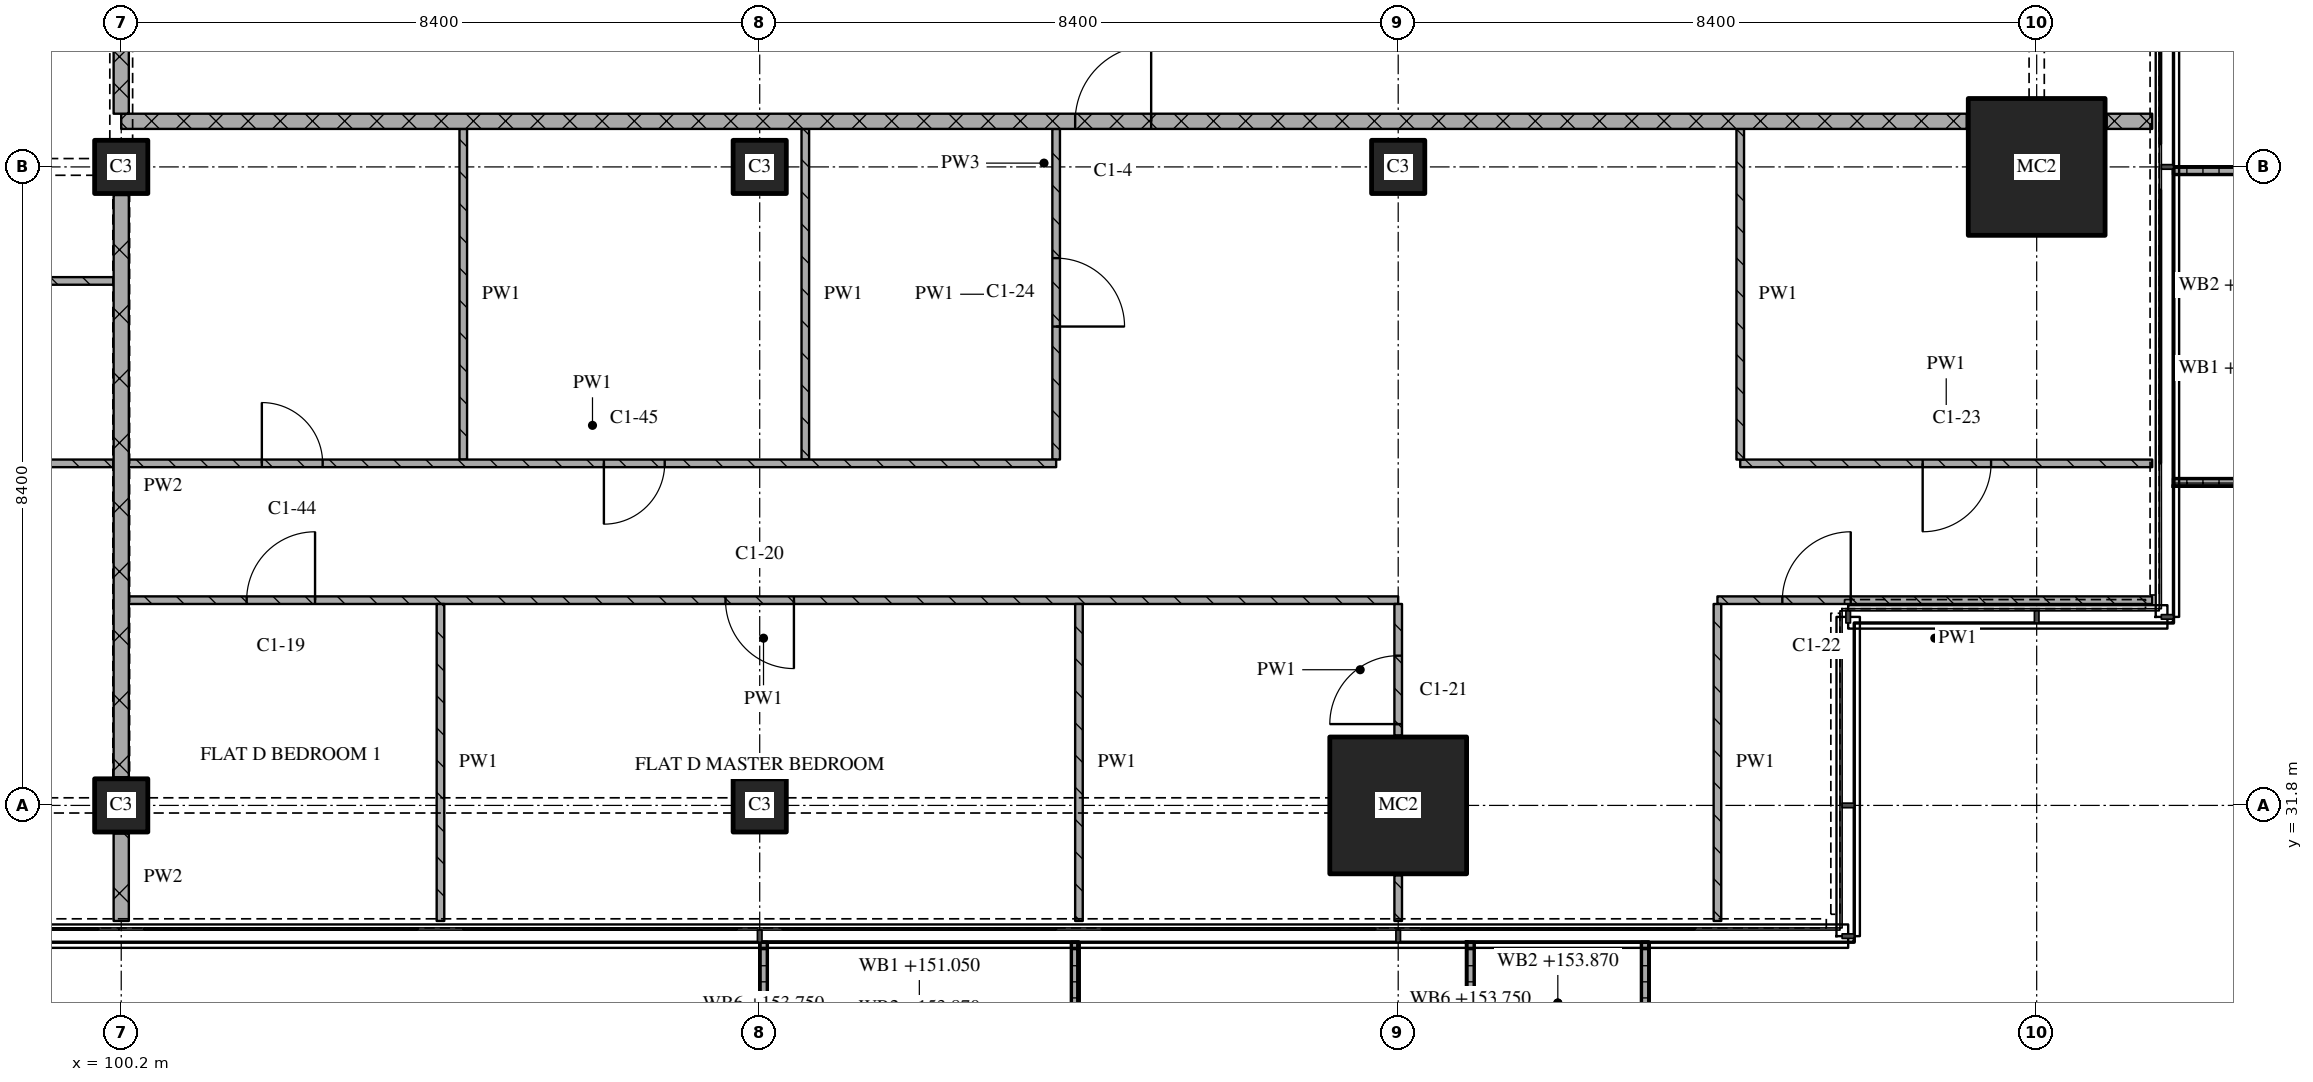
"""IFC4 building model, lengths in metres.
Left out: names, types, materials, properties, quantities, classifications, styles, units other than length and angle.
Written with IfcOpenShell. Run it as: python <this file> out.ifc"""

import sys

from ifc_helpers import new_model, si_unit, direction, frame, frame_2d, origin, origin_2d, place, context, subcontext, project, spatial, polyline, rectangle, outline, extrude, element, fill, save


model = new_model("IFC4")
c1 = context("Model", 3, precision=1e-05, world=origin(), true_north=direction((0.0, 1.0)))
c2 = subcontext(c1, "Body", "Model", "MODEL_VIEW")
j1 = project(units=[si_unit("LENGTHUNIT", "METRE"), si_unit("PLANEANGLEUNIT", "RADIAN")], contexts=[c1])
p1 = place(None, origin())
s1 = spatial("IfcSite", under=j1, at=p1, CompositionType="ELEMENT")
p2 = place(p1, origin())
s2 = spatial("IfcBuilding", under=s1, at=p2, CompositionType="ELEMENT")
p3 = place(p2, frame((0.0, 0.0, 151.05)))
s3 = spatial("IfcBuildingStorey", under=s2, at=p3, CompositionType="ELEMENT", Elevation=151.05)
for number, where, z_axis, x_axis in (
    (1, (100.2, 31.8, 0.0), (0.0, 0.0, 1.0), (1.0, 0.0, 0.0)),
    (2, (100.2, 40.2, 0.0), (0.0, 0.0, 1.0), (1.0, 0.0, 0.0)),
    (3, (108.6, 31.8, 0.0), (0.0, 0.0, 1.0), (1.0, 0.0, 0.0)),
    (4, (108.6, 40.2, 0.0), (0.0, 0.0, 1.0), (1.0, 0.0, 0.0)),
):
    element("IfcColumn", number, at=place(p3, frame(where, z_axis=z_axis, x_axis=x_axis)), inside=s3, PredefinedType="COLUMN", context=c2, shape_type="SweptSolid", body=[
        extrude(rectangle(XDim=0.7, YDim=0.7, at=origin_2d()), origin(), (0.0, 0.0, 1.0), 3.6),
    ])
p4 = place(p3, frame((117.0, 31.8, 0.0), z_axis=(0.0, 0.0, 1.0), x_axis=(1.0, 0.0, 0.0)))
e5 = element("IfcColumn", 5, at=p4, inside=s3, PredefinedType="COLUMN", context=c2, shape_type="SweptSolid", body=[
    extrude(rectangle(XDim=1.8, YDim=1.8, at=origin_2d()), origin(), (0.0, 0.0, 1.0), 3.6),
])
p5 = place(p3, frame((117.0, 40.2, 0.0), z_axis=(0.0, 0.0, 1.0), x_axis=(1.0, 0.0, 0.0)))
e6 = element("IfcColumn", 6, at=p5, inside=s3, PredefinedType="COLUMN", context=c2, shape_type="SweptSolid", body=[
    extrude(rectangle(XDim=0.7, YDim=0.7, at=origin_2d()), origin(), (0.0, 0.0, 1.0), 3.6),
])
p6 = place(p3, frame((125.4, 40.2, 0.0), z_axis=(0.0, 0.0, 1.0), x_axis=(1.0, 0.0, 0.0)))
e7 = element("IfcColumn", 7, at=p6, inside=s3, PredefinedType="COLUMN", context=c2, shape_type="SweptSolid", body=[
    extrude(rectangle(XDim=1.8, YDim=1.8, at=origin_2d()), origin(), (0.0, 0.0, 1.0), 3.6),
])
p7 = place(p3, origin())
e8 = element("IfcWall", 8, at=p7, inside=s3, PredefinedType="SOLIDWALL", context=c2, shape_type="SweptSolid", body=[
    extrude(outline(polyline([(108.6, 30.0), (108.7, 30.0), (108.7, 28.367), (112.7, 28.367), (112.7, 30.0), (112.8, 30.0), (112.8, 28.267), (108.6, 28.267), (108.6, 30.0)])), origin(), (0.0, 0.0, 1.0), 1.0),
])
p8 = place(p3, origin())
e9 = element("IfcWall", 9, at=p8, inside=s3, PredefinedType="SOLIDWALL", context=c2, shape_type="SweptSolid", body=[
    extrude(outline(polyline([(117.9, 30.0), (118.0, 30.0), (118.0, 28.5), (120.2, 28.5), (120.2, 30.0), (120.3, 30.0), (120.3, 28.4), (117.9, 28.4), (117.9, 30.0)])), origin(), (0.0, 0.0, 1.0), 1.0),
])
p9 = place(p3, origin())
e10 = element("IfcWall", 10, at=p9, inside=s3, PredefinedType="SOLIDWALL", context=c2, shape_type="SweptSolid", body=[
    extrude(outline(polyline([(127.2, 36.0), (127.2, 36.1), (128.833, 36.1), (128.833, 40.1), (127.2, 40.1), (127.2, 40.2), (128.933, 40.2), (128.933, 36.0), (127.2, 36.0)])), origin(), (0.0, 0.0, 1.0), 1.0),
])
p10 = place(p3, frame((117.0, 34.5, 0.0), z_axis=(0.0, 0.0, 1.0), x_axis=(-1.0, 0.0, 0.0)))
e11 = element("IfcWall", 11, at=p10, inside=s3, PredefinedType="PARTITIONING", context=c2, shape_type="SweptSolid", body=[
    extrude(rectangle(XDim=16.7, YDim=0.1, at=frame_2d((8.35, 0.0))), origin(), (0.0, 0.0, 1.0), 3.32),
])
p11 = place(p10, frame((7.95, 0.0, 0.0)))
e12 = element("IfcOpeningElement", 12, at=p11, cuts=e11, PredefinedType="OPENING", context=c2, shape_type="SweptSolid", body=[
    extrude(rectangle(XDim=0.9, YDim=2.1, at=frame_2d((0.45, 1.05))), frame((0.0, 0.06, 0.0), z_axis=(0.0, -1.0, 0.0), x_axis=(1.0, 0.0, 0.0)), (0.0, 0.0, 1.0), 0.12),
])
p12 = place(p10, frame((14.25, 0.0, 0.0)))
e13 = element("IfcOpeningElement", 13, at=p12, cuts=e11, PredefinedType="OPENING", context=c2, shape_type="SweptSolid", body=[
    extrude(rectangle(XDim=0.9, YDim=2.1, at=frame_2d((0.45, 1.05))), frame((0.0, 0.06, 0.0), z_axis=(0.0, -1.0, 0.0), x_axis=(1.0, 0.0, 0.0)), (0.0, 0.0, 1.0), 0.12),
])
p13 = place(p3, frame((126.92, 34.5, 0.0), z_axis=(0.0, 0.0, 1.0), x_axis=(-1.0, 0.0, 0.0)))
e14 = element("IfcWall", 14, at=p13, inside=s3, PredefinedType="PARTITIONING", context=c2, shape_type="SweptSolid", body=[
    extrude(rectangle(XDim=5.72, YDim=0.1, at=frame_2d((2.86, 0.0))), origin(), (0.0, 0.0, 1.0), 3.32),
])
p14 = place(p13, frame((3.966, 0.0, 0.0)))
e15 = element("IfcOpeningElement", 15, at=p14, cuts=e14, PredefinedType="OPENING", context=c2, shape_type="SweptSolid", body=[
    extrude(rectangle(XDim=0.9, YDim=2.1, at=frame_2d((0.45, 1.05))), frame((0.0, 0.06, 0.0), z_axis=(0.0, -1.0, 0.0), x_axis=(1.0, 0.0, 0.0)), (0.0, 0.0, 1.0), 0.12),
])
p15 = place(p3, frame((121.5, 36.3, 0.0), z_axis=(0.0, 0.0, 1.0), x_axis=(1.0, 0.0, 0.0)))
e16 = element("IfcWall", 16, at=p15, inside=s3, PredefinedType="PARTITIONING", context=c2, shape_type="SweptSolid", body=[
    extrude(rectangle(XDim=5.42, YDim=0.1, at=frame_2d((2.71, 0.0))), origin(), (0.0, 0.0, 1.0), 3.32),
])
p16 = place(p15, frame((2.4, 0.0, 0.0)))
e17 = element("IfcOpeningElement", 17, at=p16, cuts=e16, PredefinedType="OPENING", context=c2, shape_type="SweptSolid", body=[
    extrude(rectangle(XDim=0.9, YDim=2.1, at=frame_2d((0.45, 1.05))), frame((0.0, 0.06, 0.0), z_axis=(0.0, -1.0, 0.0), x_axis=(1.0, 0.0, 0.0)), (0.0, 0.0, 1.0), 0.12),
])
p17 = place(p3, frame((93.0, 38.7, 0.0), z_axis=(0.0, 0.0, 1.0), x_axis=(1.0, 0.0, 0.0)))
e18 = element("IfcWall", 18, at=p17, inside=s3, PredefinedType="PARTITIONING", context=c2, shape_type="SweptSolid", body=[
    extrude(rectangle(XDim=7.1, YDim=0.1, at=frame_2d((3.55, 0.0))), origin(), (0.0, 0.0, 1.0), 3.32),
])
p18 = place(p17, frame((5.45, 0.0, 0.0)))
e19 = element("IfcOpeningElement", 19, at=p18, cuts=e18, PredefinedType="OPENING", context=c2, shape_type="SweptSolid", body=[
    extrude(rectangle(XDim=0.8, YDim=2.1, at=frame_2d((0.4, 1.05))), frame((0.0, 0.06, 0.0), z_axis=(0.0, -1.0, 0.0), x_axis=(1.0, 0.0, 0.0)), (0.0, 0.0, 1.0), 0.12),
])
p19 = place(p3, frame((124.48, 40.8, 0.0), z_axis=(0.0, 0.0, 1.0), x_axis=(-1.0, 0.0, 0.0)))
e20 = element("IfcWall", 20, at=p19, inside=s3, PredefinedType="PARTITIONING", context=c2, shape_type="SweptSolid", body=[
    extrude(rectangle(XDim=24.28, YDim=0.2, at=frame_2d((12.14, 0.0))), origin(), (0.0, 0.0, 1.0), 3.32),
])
p20 = place(p19, frame((10.73, 0.0, 0.0)))
e21 = element("IfcOpeningElement", 21, at=p20, cuts=e20, PredefinedType="OPENING", context=c2, shape_type="SweptSolid", body=[
    extrude(rectangle(XDim=1.0, YDim=2.1, at=frame_2d((0.5, 1.05))), frame((0.0, 0.11, 0.0), z_axis=(0.0, -1.0, 0.0), x_axis=(1.0, 0.0, 0.0)), (0.0, 0.0, 1.0), 0.22),
])
p21 = place(p3, frame((126.32, 40.8, 0.0), z_axis=(0.0, 0.0, 1.0), x_axis=(1.0, 0.0, 0.0)))
e22 = element("IfcWall", 22, at=p21, inside=s3, PredefinedType="PARTITIONING", context=c2, shape_type="SweptSolid", body=[
    extrude(rectangle(XDim=0.6, YDim=0.2, at=frame_2d((0.3, 0.0))), origin(), (0.0, 0.0, 1.0), 3.32),
])
p22 = place(p3, frame((100.2, 43.1, 0.0), z_axis=(0.0, 0.0, 1.0), x_axis=(0.0, -1.0, 0.0)))
e23 = element("IfcWall", 23, at=p22, inside=s3, PredefinedType="PARTITIONING", context=c2, shape_type="SweptSolid", body=[
    extrude(rectangle(XDim=2.2, YDim=0.2, at=frame_2d((1.1, 0.0))), origin(), (0.0, 0.0, 1.0), 2.43),
])
p23 = place(p3, frame((100.2, 31.43, 0.0), z_axis=(0.0, 0.0, 1.0), x_axis=(0.0, -1.0, 0.0)))
e24 = element("IfcWall", 24, at=p23, inside=s3, PredefinedType="PARTITIONING", context=c2, shape_type="SweptSolid", body=[
    extrude(rectangle(XDim=1.15, YDim=0.2, at=frame_2d((0.575, 0.0))), origin(), (0.0, 0.0, 1.0), 3.32),
])
p24 = place(p3, frame((100.2, 39.83, 0.0), z_axis=(0.0, 0.0, 1.0), x_axis=(0.0, -1.0, 0.0)))
e25 = element("IfcWall", 25, at=p24, inside=s3, PredefinedType="PARTITIONING", context=c2, shape_type="SweptSolid", body=[
    extrude(rectangle(XDim=7.66, YDim=0.2, at=frame_2d((3.83, 0.0))), origin(), (0.0, 0.0, 1.0), 2.72),
])
p25 = place(p3, frame((104.4, 34.45, 0.0), z_axis=(0.0, 0.0, 1.0), x_axis=(0.0, -1.0, 0.0)))
e26 = element("IfcWall", 26, at=p25, inside=s3, PredefinedType="PARTITIONING", context=c2, shape_type="SweptSolid", body=[
    extrude(rectangle(XDim=4.17, YDim=0.1, at=frame_2d((2.085, 0.0))), origin(), (0.0, 0.0, 1.0), 3.32),
])
for number, where, z_axis, x_axis in (
    (27, (104.7, 40.7, 0.0), (0.0, 0.0, 1.0), (0.0, -1.0, 0.0)),
    (28, (109.2, 40.7, 0.0), (0.0, 0.0, 1.0), (0.0, -1.0, 0.0)),
):
    element("IfcWall", number, at=place(p3, frame(where, z_axis=z_axis, x_axis=x_axis)), inside=s3, PredefinedType="PARTITIONING", context=c2, shape_type="SweptSolid", body=[
        extrude(rectangle(XDim=4.35, YDim=0.1, at=frame_2d((2.175, 0.0))), origin(), (0.0, 0.0, 1.0), 3.32),
    ])
p26 = place(p3, frame((112.5, 36.35, 0.0), z_axis=(0.0, 0.0, 1.0), x_axis=(0.0, 1.0, 0.0)))
e29 = element("IfcWall", 29, at=p26, inside=s3, PredefinedType="PARTITIONING", context=c2, shape_type="SweptSolid", body=[
    extrude(rectangle(XDim=4.35, YDim=0.1, at=frame_2d((2.175, 0.0))), origin(), (0.0, 0.0, 1.0), 3.32),
])
p27 = place(p26, frame((1.75, 0.0, 0.0)))
e30 = element("IfcOpeningElement", 30, at=p27, cuts=e29, PredefinedType="OPENING", context=c2, shape_type="SweptSolid", body=[
    extrude(rectangle(XDim=0.9, YDim=2.1, at=frame_2d((0.45, 1.05))), frame((0.0, 0.06, 0.0), z_axis=(0.0, -1.0, 0.0), x_axis=(1.0, 0.0, 0.0)), (0.0, 0.0, 1.0), 0.12),
])
p28 = place(p3, frame((112.8, 34.45, 0.0), z_axis=(0.0, 0.0, 1.0), x_axis=(0.0, -1.0, 0.0)))
e31 = element("IfcWall", 31, at=p28, inside=s3, PredefinedType="PARTITIONING", context=c2, shape_type="SweptSolid", body=[
    extrude(rectangle(XDim=4.17, YDim=0.1, at=frame_2d((2.085, 0.0))), origin(), (0.0, 0.0, 1.0), 3.32),
])
p29 = place(p3, frame((117.0, 30.88, 0.0), z_axis=(0.0, 0.0, 1.0), x_axis=(0.0, -1.0, 0.0)))
e32 = element("IfcWall", 32, at=p29, inside=s3, PredefinedType="PARTITIONING", context=c2, shape_type="SweptSolid", body=[
    extrude(rectangle(XDim=0.6, YDim=0.1, at=frame_2d((0.3, 0.0))), origin(), (0.0, 0.0, 1.0), 3.32),
])
p30 = place(p3, frame((117.0, 32.72, 0.0), z_axis=(0.0, 0.0, 1.0), x_axis=(0.0, 1.0, 0.0)))
e33 = element("IfcWall", 33, at=p30, inside=s3, PredefinedType="PARTITIONING", context=c2, shape_type="SweptSolid", body=[
    extrude(rectangle(XDim=1.73, YDim=0.1, at=frame_2d((0.865, 0.0))), origin(), (0.0, 0.0, 1.0), 3.32),
])
p31 = place(p30, frame((0.15, 0.0, 0.0)))
e34 = element("IfcOpeningElement", 34, at=p31, cuts=e33, PredefinedType="OPENING", context=c2, shape_type="SweptSolid", body=[
    extrude(rectangle(XDim=0.9, YDim=2.1, at=frame_2d((0.45, 1.05))), frame((0.0, 0.06, 0.0), z_axis=(0.0, -1.0, 0.0), x_axis=(1.0, 0.0, 0.0)), (0.0, 0.0, 1.0), 0.12),
])
p32 = place(p3, frame((121.2, 34.45, 0.0), z_axis=(0.0, 0.0, 1.0), x_axis=(0.0, -1.0, 0.0)))
e35 = element("IfcWall", 35, at=p32, inside=s3, PredefinedType="PARTITIONING", context=c2, shape_type="SweptSolid", body=[
    extrude(rectangle(XDim=4.17, YDim=0.1, at=frame_2d((2.085, 0.0))), origin(), (0.0, 0.0, 1.0), 3.32),
])
p33 = place(p3, frame((121.5, 40.7, 0.0), z_axis=(0.0, 0.0, 1.0), x_axis=(0.0, -1.0, 0.0)))
e36 = element("IfcWall", 36, at=p33, inside=s3, PredefinedType="PARTITIONING", context=c2, shape_type="SweptSolid", body=[
    extrude(rectangle(XDim=4.35, YDim=0.1, at=frame_2d((2.175, 0.0))), origin(), (0.0, 0.0, 1.0), 3.32),
])
p34 = place(p3, frame((100.1, 36.3, 0.0), z_axis=(0.0, 0.0, 1.0), x_axis=(-1.0, 0.0, 0.0)))
e37 = element("IfcWall", 37, at=p34, inside=s3, PredefinedType="PARTITIONING", context=c2, shape_type="SweptSolid", body=[
    extrude(rectangle(XDim=12.5, YDim=0.1, at=frame_2d((6.25, 0.0))), origin(), (0.0, 0.0, 1.0), 3.32),
])
p35 = place(p34, frame((3.65, 0.0, 0.0)))
e38 = element("IfcOpeningElement", 38, at=p35, cuts=e37, PredefinedType="OPENING", context=c2, shape_type="SweptSolid", body=[
    extrude(rectangle(XDim=0.9, YDim=2.1, at=frame_2d((0.45, 1.05))), frame((0.0, 0.06, 0.0), z_axis=(0.0, -1.0, 0.0), x_axis=(1.0, 0.0, 0.0)), (0.0, 0.0, 1.0), 0.12),
])
p36 = place(p34, frame((9.95, 0.0, 0.0)))
e39 = element("IfcOpeningElement", 39, at=p36, cuts=e37, PredefinedType="OPENING", context=c2, shape_type="SweptSolid", body=[
    extrude(rectangle(XDim=0.9, YDim=2.1, at=frame_2d((0.45, 1.05))), frame((0.0, 0.06, 0.0), z_axis=(0.0, -1.0, 0.0), x_axis=(1.0, 0.0, 0.0)), (0.0, 0.0, 1.0), 0.12),
])
p37 = place(p3, frame((100.3, 36.3, 0.0), z_axis=(0.0, 0.0, 1.0), x_axis=(1.0, 0.0, 0.0)))
e40 = element("IfcWall", 40, at=p37, inside=s3, PredefinedType="PARTITIONING", context=c2, shape_type="SweptSolid", body=[
    extrude(rectangle(XDim=12.2, YDim=0.1, at=frame_2d((6.1, 0.0))), origin(), (0.0, 0.0, 1.0), 3.32),
])
p38 = place(p37, frame((1.75, 0.0, 0.0)))
e41 = element("IfcOpeningElement", 41, at=p38, cuts=e40, PredefinedType="OPENING", context=c2, shape_type="SweptSolid", body=[
    extrude(rectangle(XDim=0.8, YDim=2.1, at=frame_2d((0.4, 1.05))), frame((0.0, 0.06, 0.0), z_axis=(0.0, -1.0, 0.0), x_axis=(1.0, 0.0, 0.0)), (0.0, 0.0, 1.0), 0.12),
])
p39 = place(p37, frame((6.25, 0.0, 0.0)))
e42 = element("IfcOpeningElement", 42, at=p39, cuts=e40, PredefinedType="OPENING", context=c2, shape_type="SweptSolid", body=[
    extrude(rectangle(XDim=0.8, YDim=2.1, at=frame_2d((0.4, 1.05))), frame((0.0, 0.06, 0.0), z_axis=(0.0, -1.0, 0.0), x_axis=(1.0, 0.0, 0.0)), (0.0, 0.0, 1.0), 0.12),
])
p40 = place(p11, origin())
e43 = element("IfcDoor", 43, at=p40, inside=s3, OperationType="SINGLE_SWING_LEFT", PredefinedType="DOOR", context=c2, shape_type="SweptSolid", body=[
    extrude(rectangle(XDim=0.9, YDim=2.1, at=frame_2d((0.45, 1.05))), frame((0.0, 0.025, 0.0), z_axis=(0.0, -1.0, 0.0), x_axis=(1.0, 0.0, 0.0)), (0.0, 0.0, 1.0), 0.05),
])
fill(e12, e43)
p41 = place(p12, origin())
e44 = element("IfcDoor", 44, at=p41, inside=s3, OperationType="SINGLE_SWING_RIGHT", PredefinedType="DOOR", context=c2, shape_type="SweptSolid", body=[
    extrude(rectangle(XDim=0.9, YDim=2.1, at=frame_2d((0.45, 1.05))), frame((0.0, 0.025, 0.0), z_axis=(0.0, -1.0, 0.0), x_axis=(1.0, 0.0, 0.0)), (0.0, 0.0, 1.0), 0.05),
])
fill(e13, e44)
p42 = place(p14, origin())
e45 = element("IfcDoor", 45, at=p42, inside=s3, OperationType="SINGLE_SWING_RIGHT", PredefinedType="DOOR", context=c2, shape_type="SweptSolid", body=[
    extrude(rectangle(XDim=0.9, YDim=2.1, at=frame_2d((0.45, 1.05))), frame((0.0, 0.025, 0.0), z_axis=(0.0, -1.0, 0.0), x_axis=(1.0, 0.0, 0.0)), (0.0, 0.0, 1.0), 0.05),
])
fill(e15, e45)
p43 = place(p16, origin())
e46 = element("IfcDoor", 46, at=p43, inside=s3, OperationType="SINGLE_SWING_RIGHT", PredefinedType="DOOR", context=c2, shape_type="SweptSolid", body=[
    extrude(rectangle(XDim=0.9, YDim=2.1, at=frame_2d((0.45, 1.05))), frame((0.0, 0.025, 0.0), z_axis=(0.0, -1.0, 0.0), x_axis=(1.0, 0.0, 0.0)), (0.0, 0.0, 1.0), 0.05),
])
fill(e17, e46)
p44 = place(p20, origin())
e47 = element("IfcDoor", 47, at=p44, inside=s3, OperationType="SINGLE_SWING_RIGHT", PredefinedType="DOOR", context=c2, shape_type="SweptSolid", body=[
    extrude(rectangle(XDim=1.0, YDim=2.1, at=frame_2d((0.5, 1.05))), frame((0.0, 0.025, 0.0), z_axis=(0.0, -1.0, 0.0), x_axis=(1.0, 0.0, 0.0)), (0.0, 0.0, 1.0), 0.05),
])
fill(e21, e47)
p45 = place(p27, origin())
e48 = element("IfcDoor", 48, at=p45, inside=s3, OperationType="SINGLE_SWING_RIGHT", PredefinedType="DOOR", context=c2, shape_type="SweptSolid", body=[
    extrude(rectangle(XDim=0.9, YDim=2.1, at=frame_2d((0.45, 1.05))), frame((0.0, 0.025, 0.0), z_axis=(0.0, -1.0, 0.0), x_axis=(1.0, 0.0, 0.0)), (0.0, 0.0, 1.0), 0.05),
])
fill(e30, e48)
p46 = place(p31, origin())
e49 = element("IfcDoor", 49, at=p46, inside=s3, OperationType="SINGLE_SWING_LEFT", PredefinedType="DOOR", context=c2, shape_type="SweptSolid", body=[
    extrude(rectangle(XDim=0.9, YDim=2.1, at=frame_2d((0.45, 1.05))), frame((0.0, 0.025, 0.0), z_axis=(0.0, -1.0, 0.0), x_axis=(1.0, 0.0, 0.0)), (0.0, 0.0, 1.0), 0.05),
])
fill(e34, e49)
p47 = place(p38, origin())
e50 = element("IfcDoor", 50, at=p47, inside=s3, OperationType="SINGLE_SWING_LEFT", PredefinedType="DOOR", context=c2, shape_type="SweptSolid", body=[
    extrude(rectangle(XDim=0.8, YDim=2.1, at=frame_2d((0.4, 1.05))), frame((0.0, 0.025, 0.0), z_axis=(0.0, -1.0, 0.0), x_axis=(1.0, 0.0, 0.0)), (0.0, 0.0, 1.0), 0.05),
])
fill(e41, e50)
p48 = place(p39, origin())
e51 = element("IfcDoor", 51, at=p48, inside=s3, OperationType="SINGLE_SWING_RIGHT", PredefinedType="DOOR", context=c2, shape_type="SweptSolid", body=[
    extrude(rectangle(XDim=0.8, YDim=2.1, at=frame_2d((0.4, 1.05))), frame((0.0, 0.025, 0.0), z_axis=(0.0, -1.0, 0.0), x_axis=(1.0, 0.0, 0.0)), (0.0, 0.0, 1.0), 0.05),
])
fill(e42, e51)
save(model, sys.argv[1])
